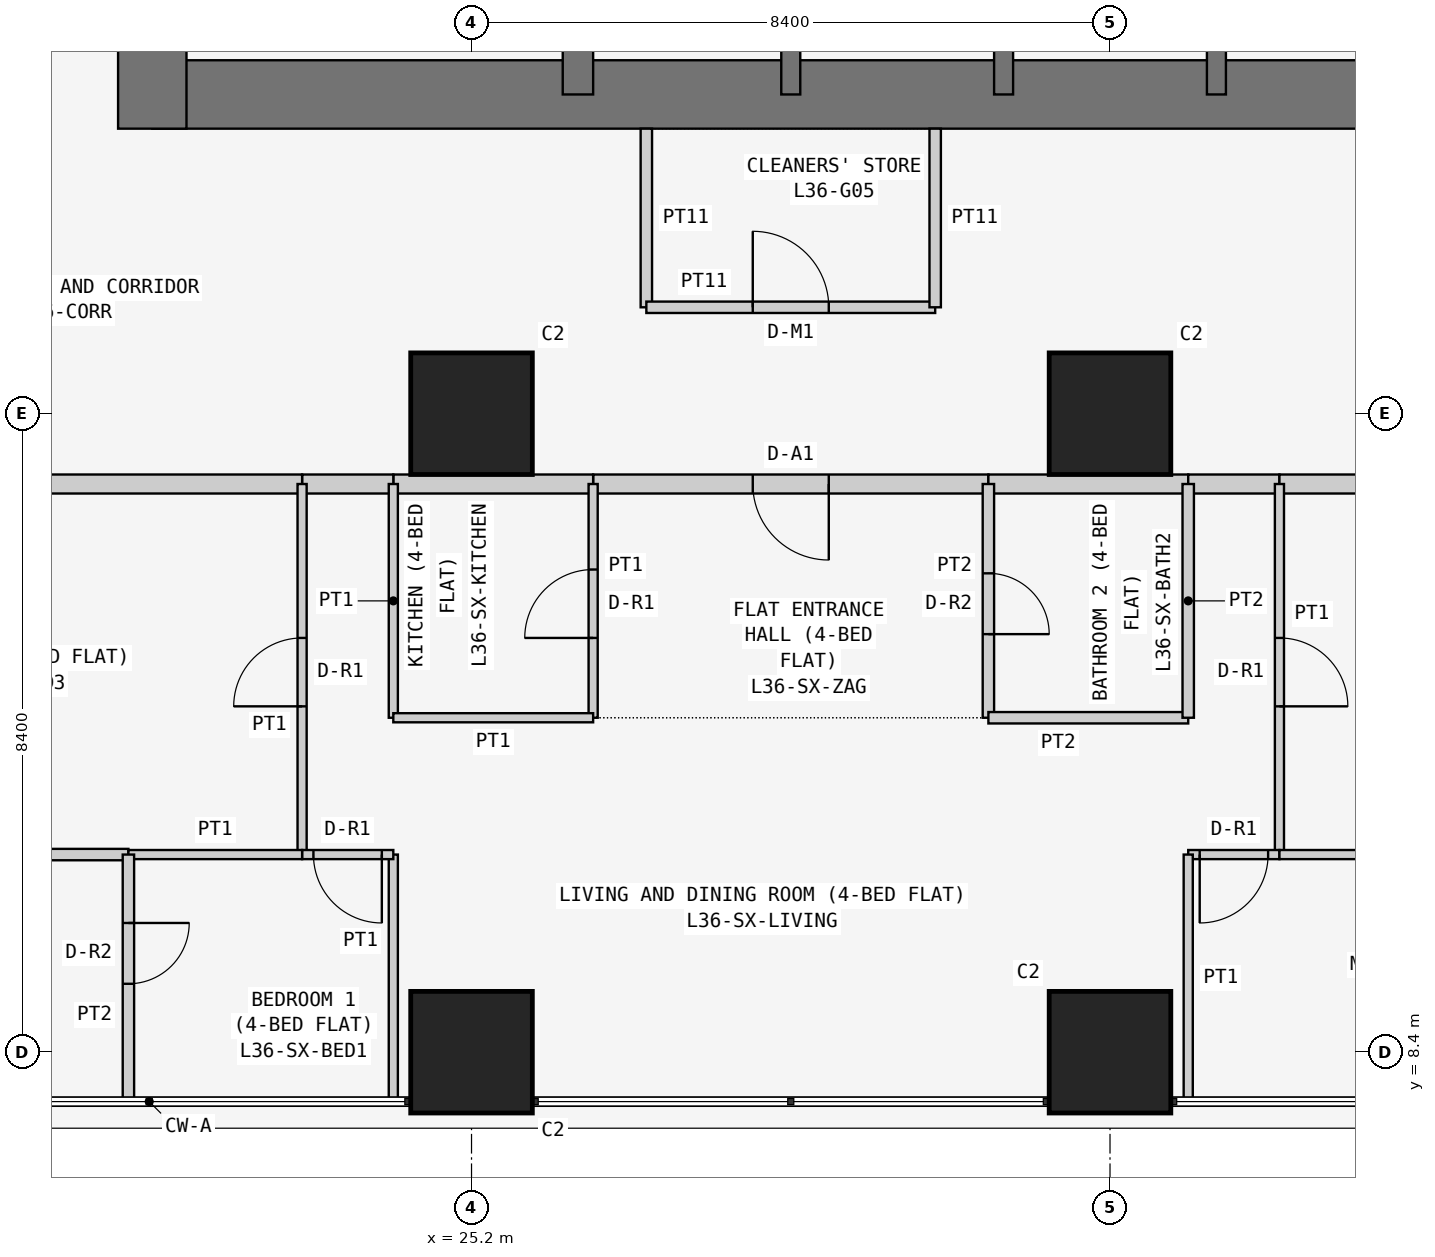
"""IFC4 building model, lengths in metres.
Left out: names, types, materials, properties, quantities, classifications, styles, units other than length and angle.
Written with IfcOpenShell. Run it as: python <this file> out.ifc"""

import sys

from ifc_helpers import new_model, si_unit, direction, frame, frame_2d, origin, origin_2d, place, context, subcontext, project, spatial, rectangle, extrude, element, fill, save


model = new_model("IFC4")
c1 = context("Model", 3, precision=1e-05, world=origin(), true_north=direction((0.0, 1.0)))
c2 = subcontext(c1, "Body", "Model", "MODEL_VIEW")
j1 = project(units=[si_unit("LENGTHUNIT", "METRE"), si_unit("PLANEANGLEUNIT", "RADIAN")], contexts=[c1])
p1 = place(None, origin())
s1 = spatial("IfcSite", under=j1, at=p1, CompositionType="ELEMENT")
p2 = place(p1, origin())
s2 = spatial("IfcBuilding", under=s1, at=p2, CompositionType="ELEMENT")
p3 = place(p2, frame((0.0, 0.0, 141.3)))
s3 = spatial("IfcBuildingStorey", under=s2, at=p3, CompositionType="ELEMENT", Elevation=141.3)
for number, where, z_axis, x_axis in (
    (1, (25.2, 8.4, 0.0), (0.0, 0.0, 1.0), (1.0, 0.0, 0.0)),
    (2, (25.2, 16.8, 0.0), (0.0, 0.0, 1.0), (1.0, 0.0, 0.0)),
    (3, (33.6, 8.4, 0.0), (0.0, 0.0, 1.0), (1.0, 0.0, 0.0)),
    (4, (33.6, 16.8, 0.0), (0.0, 0.0, 1.0), (1.0, 0.0, 0.0)),
):
    element("IfcColumn", number, at=place(p3, frame(where, z_axis=z_axis, x_axis=x_axis)), inside=s3, PredefinedType="COLUMN", context=c2, shape_type="SweptSolid", body=[
        extrude(rectangle(XDim=1.6, YDim=1.6, at=origin_2d()), origin(), (0.0, 0.0, 1.0), 3.6),
    ])
p4 = place(p3, frame((21.0, 21.0, 0.0), z_axis=(0.0, 0.0, 1.0), x_axis=(1.0, 0.0, 0.0)))
e5 = element("IfcWall", 5, at=p4, inside=s3, PredefinedType="SHEAR", context=c2, shape_type="SweptSolid", body=[
    extrude(rectangle(XDim=17.25, YDim=0.9, at=frame_2d((8.625, 0.0))), origin(), (0.0, 0.0, 1.0), 3.6),
])
p5 = place(p3, frame((21.0, 37.8, 0.0), z_axis=(0.0, 0.0, 1.0), x_axis=(0.0, -1.0, 0.0)))
e6 = element("IfcWall", 6, at=p5, inside=s3, PredefinedType="SHEAR", context=c2, shape_type="SweptSolid", body=[
    extrude(rectangle(XDim=17.25, YDim=0.9, at=frame_2d((8.625, 0.0))), origin(), (0.0, 0.0, 1.0), 3.6),
])
p6 = place(p5, frame((5.4, 0.0, 0.0)))
e7 = element("IfcOpeningElement", 7, at=p6, cuts=e6, PredefinedType="OPENING", context=c2, shape_type="SweptSolid", body=[
    extrude(rectangle(XDim=1.2, YDim=2.1, at=frame_2d((0.6, 1.05))), frame((0.0, 0.46, 0.0), z_axis=(0.0, -1.0, 0.0), x_axis=(1.0, 0.0, 0.0)), (0.0, 0.0, 1.0), 0.92),
])
p7 = place(p3, frame((26.6, 21.0, 0.0), z_axis=(0.0, 0.0, 1.0), x_axis=(0.0, 1.0, 0.0)))
e8 = element("IfcWall", 8, at=p7, inside=s3, PredefinedType="SHEAR", context=c2, shape_type="SweptSolid", body=[
    extrude(rectangle(XDim=16.8, YDim=0.4, at=frame_2d((8.4, 0.0))), origin(), (0.0, 0.0, 1.0), 3.6),
])
p8 = place(p7, frame((10.4, 0.0, 0.0)))
e9 = element("IfcOpeningElement", 9, at=p8, cuts=e8, PredefinedType="OPENING", context=c2, shape_type="SweptSolid", body=[
    extrude(rectangle(XDim=1.2, YDim=2.1, at=frame_2d((0.6, 1.05))), frame((0.0, 0.21, 0.0), z_axis=(0.0, -1.0, 0.0), x_axis=(1.0, 0.0, 0.0)), (0.0, 0.0, 1.0), 0.42),
])
for number, where, z_axis, x_axis in (
    (10, (29.4, 21.0, 0.0), (0.0, 0.0, 1.0), (0.0, 1.0, 0.0)),
    (11, (32.2, 21.0, 0.0), (0.0, 0.0, 1.0), (0.0, 1.0, 0.0)),
    (12, (35.0, 21.0, 0.0), (0.0, 0.0, 1.0), (0.0, 1.0, 0.0)),
):
    element("IfcWall", number, at=place(p3, frame(where, z_axis=z_axis, x_axis=x_axis)), inside=s3, PredefinedType="SHEAR", context=c2, shape_type="SweptSolid", body=[
        extrude(rectangle(XDim=3.2, YDim=0.25, at=frame_2d((1.6, 0.0))), origin(), (0.0, 0.0, 1.0), 3.6),
    ])
p9 = place(p3, frame((27.5, 20.55, 0.0), z_axis=(0.0, 0.0, 1.0), x_axis=(0.0, -1.0, 0.0)))
e13 = element("IfcWall", 13, at=p9, inside=s3, PredefinedType="PARTITIONING", context=c2, shape_type="SweptSolid", body=[
    extrude(rectangle(XDim=2.35, YDim=0.15, at=frame_2d((1.175, 0.0))), origin(), (0.0, 0.0, 1.0), 3.45),
])
p10 = place(p3, frame((27.5, 18.2, 0.0), z_axis=(0.0, 0.0, 1.0), x_axis=(1.0, 0.0, 0.0)))
e14 = element("IfcWall", 14, at=p10, inside=s3, PredefinedType="PARTITIONING", context=c2, shape_type="SweptSolid", body=[
    extrude(rectangle(XDim=3.8, YDim=0.15, at=frame_2d((1.9, 0.0))), origin(), (0.0, 0.0, 1.0), 3.45),
])
p11 = place(p10, frame((1.4, 0.0, 0.0)))
e15 = element("IfcOpeningElement", 15, at=p11, cuts=e14, PredefinedType="OPENING", context=c2, shape_type="SweptSolid", body=[
    extrude(rectangle(XDim=1.0, YDim=2.1, at=frame_2d((0.5, 1.05))), frame((0.0, 0.085, 0.0), z_axis=(0.0, -1.0, 0.0), x_axis=(1.0, 0.0, 0.0)), (0.0, 0.0, 1.0), 0.17),
])
p12 = place(p3, frame((31.3, 18.2, 0.0), z_axis=(0.0, 0.0, 1.0), x_axis=(0.0, 1.0, 0.0)))
e16 = element("IfcWall", 16, at=p12, inside=s3, PredefinedType="PARTITIONING", context=c2, shape_type="SweptSolid", body=[
    extrude(rectangle(XDim=2.35, YDim=0.15, at=frame_2d((1.175, 0.0))), origin(), (0.0, 0.0, 1.0), 3.45),
])
p13 = place(p3, frame((32.0, 15.875, 0.0), z_axis=(0.0, 0.0, 1.0), x_axis=(-1.0, 0.0, 0.0)))
e17 = element("IfcWall", 17, at=p13, inside=s3, PredefinedType="PARTITIONING", context=c2, shape_type="SweptSolid", body=[
    extrude(rectangle(XDim=5.2, YDim=0.25, at=frame_2d((2.6, 0.0))), origin(), (0.0, 0.0, 1.0), 3.45),
])
p14 = place(p13, frame((2.1, 0.0, 0.0)))
e18 = element("IfcOpeningElement", 18, at=p14, cuts=e17, PredefinedType="OPENING", context=c2, shape_type="SweptSolid", body=[
    extrude(rectangle(XDim=1.0, YDim=2.1, at=frame_2d((0.5, 1.05))), frame((0.0, 0.135, 0.0), z_axis=(0.0, -1.0, 0.0), x_axis=(1.0, 0.0, 0.0)), (0.0, 0.0, 1.0), 0.27),
])
p15 = place(p3, frame((34.629, 15.875, 0.0), z_axis=(0.0, 0.0, 1.0), x_axis=(-1.0, 0.0, 0.0)))
e19 = element("IfcWall", 19, at=p15, inside=s3, PredefinedType="PARTITIONING", context=c2, shape_type="SweptSolid", body=[
    extrude(rectangle(XDim=2.629, YDim=0.25, at=frame_2d((1.314, 0.0))), origin(), (0.0, 0.0, 1.0), 3.45),
])
p16 = place(p3, frame((26.8, 15.875, 0.0), z_axis=(0.0, 0.0, 1.0), x_axis=(-1.0, 0.0, 0.0)))
e20 = element("IfcWall", 20, at=p16, inside=s3, PredefinedType="PARTITIONING", context=c2, shape_type="SweptSolid", body=[
    extrude(rectangle(XDim=2.629, YDim=0.25, at=frame_2d((1.314, 0.0))), origin(), (0.0, 0.0, 1.0), 3.45),
])
p17 = place(p3, frame((24.171, 15.875, 0.0), z_axis=(0.0, 0.0, 1.0), x_axis=(-1.0, 0.0, 0.0)))
e21 = element("IfcWall", 21, at=p17, inside=s3, PredefinedType="PARTITIONING", context=c2, shape_type="SweptSolid", body=[
    extrude(rectangle(XDim=1.2, YDim=0.25, at=frame_2d((0.6, 0.0))), origin(), (0.0, 0.0, 1.0), 3.45),
])
p18 = place(p3, frame((35.829, 15.875, 0.0), z_axis=(0.0, 0.0, 1.0), x_axis=(-1.0, 0.0, 0.0)))
e22 = element("IfcWall", 22, at=p18, inside=s3, PredefinedType="PARTITIONING", context=c2, shape_type="SweptSolid", body=[
    extrude(rectangle(XDim=1.2, YDim=0.25, at=frame_2d((0.6, 0.0))), origin(), (0.0, 0.0, 1.0), 3.45),
])
for number, where, z_axis, x_axis in (
    (23, (42.7, 15.875, 0.0), (0.0, 0.0, 1.0), (-1.0, 0.0, 0.0)),
    (24, (22.971, 15.875, 0.0), (0.0, 0.0, 1.0), (-1.0, 0.0, 0.0)),
):
    element("IfcWall", number, at=place(p3, frame(where, z_axis=z_axis, x_axis=x_axis)), inside=s3, PredefinedType="PARTITIONING", context=c2, shape_type="SweptSolid", body=[
        extrude(rectangle(XDim=6.871, YDim=0.25, at=frame_2d((3.436, 0.0))), origin(), (0.0, 0.0, 1.0), 3.45),
    ])
p19 = place(p3, frame((32.0, 12.8, 0.0), z_axis=(0.0, 0.0, 1.0), x_axis=(0.0, 1.0, 0.0)))
e25 = element("IfcWall", 25, at=p19, inside=s3, PredefinedType="PARTITIONING", context=c2, shape_type="SweptSolid", body=[
    extrude(rectangle(XDim=3.075, YDim=0.15, at=frame_2d((1.538, 0.0))), origin(), (0.0, 0.0, 1.0), 3.45),
])
p20 = place(p19, frame((1.1, 0.0, 0.0)))
e26 = element("IfcOpeningElement", 26, at=p20, cuts=e25, PredefinedType="OPENING", context=c2, shape_type="SweptSolid", body=[
    extrude(rectangle(XDim=0.8, YDim=2.1, at=frame_2d((0.4, 1.05))), frame((0.0, 0.085, 0.0), z_axis=(0.0, -1.0, 0.0), x_axis=(1.0, 0.0, 0.0)), (0.0, 0.0, 1.0), 0.17),
])
p21 = place(p3, frame((26.8, 15.875, 0.0), z_axis=(0.0, 0.0, 1.0), x_axis=(0.0, -1.0, 0.0)))
e27 = element("IfcWall", 27, at=p21, inside=s3, PredefinedType="PARTITIONING", context=c2, shape_type="SweptSolid", body=[
    extrude(rectangle(XDim=3.075, YDim=0.12, at=frame_2d((1.538, 0.0))), origin(), (0.0, 0.0, 1.0), 3.45),
])
p22 = place(p21, frame((1.125, 0.0, 0.0)))
e28 = element("IfcOpeningElement", 28, at=p22, cuts=e27, PredefinedType="OPENING", context=c2, shape_type="SweptSolid", body=[
    extrude(rectangle(XDim=0.9, YDim=2.1, at=frame_2d((0.45, 1.05))), frame((0.0, 0.07, 0.0), z_axis=(0.0, -1.0, 0.0), x_axis=(1.0, 0.0, 0.0)), (0.0, 0.0, 1.0), 0.14),
])
p23 = place(p3, frame((32.0, 12.8, 0.0), z_axis=(0.0, 0.0, 1.0), x_axis=(1.0, 0.0, 0.0)))
e29 = element("IfcWall", 29, at=p23, inside=s3, PredefinedType="PARTITIONING", context=c2, shape_type="SweptSolid", body=[
    extrude(rectangle(XDim=2.629, YDim=0.15, at=frame_2d((1.314, 0.0))), origin(), (0.0, 0.0, 1.0), 3.45),
])
p24 = place(p3, frame((34.629, 12.8, 0.0), z_axis=(0.0, 0.0, 1.0), x_axis=(0.0, 1.0, 0.0)))
e30 = element("IfcWall", 30, at=p24, inside=s3, PredefinedType="PARTITIONING", context=c2, shape_type="SweptSolid", body=[
    extrude(rectangle(XDim=3.075, YDim=0.15, at=frame_2d((1.538, 0.0))), origin(), (0.0, 0.0, 1.0), 3.45),
])
p25 = place(p3, frame((24.171, 15.875, 0.0), z_axis=(0.0, 0.0, 1.0), x_axis=(0.0, -1.0, 0.0)))
e31 = element("IfcWall", 31, at=p25, inside=s3, PredefinedType="PARTITIONING", context=c2, shape_type="SweptSolid", body=[
    extrude(rectangle(XDim=3.075, YDim=0.12, at=frame_2d((1.538, 0.0))), origin(), (0.0, 0.0, 1.0), 3.45),
])
p26 = place(p3, frame((24.171, 12.8, 0.0), z_axis=(0.0, 0.0, 1.0), x_axis=(1.0, 0.0, 0.0)))
e32 = element("IfcWall", 32, at=p26, inside=s3, PredefinedType="PARTITIONING", context=c2, shape_type="SweptSolid", body=[
    extrude(rectangle(XDim=2.629, YDim=0.12, at=frame_2d((1.314, 0.0))), origin(), (0.0, 0.0, 1.0), 3.45),
])
p27 = place(p3, frame((35.829, 15.875, 0.0), z_axis=(0.0, 0.0, 1.0), x_axis=(0.0, -1.0, 0.0)))
e33 = element("IfcWall", 33, at=p27, inside=s3, PredefinedType="PARTITIONING", context=c2, shape_type="SweptSolid", body=[
    extrude(rectangle(XDim=4.875, YDim=0.12, at=frame_2d((2.438, 0.0))), origin(), (0.0, 0.0, 1.0), 3.45),
])
p28 = place(p27, frame((2.025, 0.0, 0.0)))
e34 = element("IfcOpeningElement", 34, at=p28, cuts=e33, PredefinedType="OPENING", context=c2, shape_type="SweptSolid", body=[
    extrude(rectangle(XDim=0.9, YDim=2.1, at=frame_2d((0.45, 1.05))), frame((0.0, 0.07, 0.0), z_axis=(0.0, -1.0, 0.0), x_axis=(1.0, 0.0, 0.0)), (0.0, 0.0, 1.0), 0.14),
])
p29 = place(p3, frame((35.829, 11.0, 0.0), z_axis=(0.0, 0.0, 1.0), x_axis=(-1.0, 0.0, 0.0)))
e35 = element("IfcWall", 35, at=p29, inside=s3, PredefinedType="PARTITIONING", context=c2, shape_type="SweptSolid", body=[
    extrude(rectangle(XDim=1.2, YDim=0.12, at=frame_2d((0.6, 0.0))), origin(), (0.0, 0.0, 1.0), 3.45),
])
p30 = place(p29, frame((0.149, 0.0, 0.0)))
e36 = element("IfcOpeningElement", 36, at=p30, cuts=e35, PredefinedType="OPENING", context=c2, shape_type="SweptSolid", body=[
    extrude(rectangle(XDim=0.9, YDim=2.1, at=frame_2d((0.45, 1.05))), frame((0.0, 0.07, 0.0), z_axis=(0.0, -1.0, 0.0), x_axis=(1.0, 0.0, 0.0)), (0.0, 0.0, 1.0), 0.14),
])
p31 = place(p3, frame((34.629, 11.0, 0.0), z_axis=(0.0, 0.0, 1.0), x_axis=(0.0, -1.0, 0.0)))
e37 = element("IfcWall", 37, at=p31, inside=s3, PredefinedType="PARTITIONING", context=c2, shape_type="SweptSolid", body=[
    extrude(rectangle(XDim=3.25, YDim=0.12, at=frame_2d((1.625, 0.0))), origin(), (0.0, 0.0, 1.0), 3.45),
])
p32 = place(p3, frame((22.971, 11.0, 0.0), z_axis=(0.0, 0.0, 1.0), x_axis=(0.0, 1.0, 0.0)))
e38 = element("IfcWall", 38, at=p32, inside=s3, PredefinedType="PARTITIONING", context=c2, shape_type="SweptSolid", body=[
    extrude(rectangle(XDim=4.875, YDim=0.12, at=frame_2d((2.438, 0.0))), origin(), (0.0, 0.0, 1.0), 3.45),
])
p33 = place(p32, frame((1.95, 0.0, 0.0)))
e39 = element("IfcOpeningElement", 39, at=p33, cuts=e38, PredefinedType="OPENING", context=c2, shape_type="SweptSolid", body=[
    extrude(rectangle(XDim=0.9, YDim=2.1, at=frame_2d((0.45, 1.05))), frame((0.0, 0.07, 0.0), z_axis=(0.0, -1.0, 0.0), x_axis=(1.0, 0.0, 0.0)), (0.0, 0.0, 1.0), 0.14),
])
p34 = place(p3, frame((24.171, 7.75, 0.0), z_axis=(0.0, 0.0, 1.0), x_axis=(0.0, 1.0, 0.0)))
e40 = element("IfcWall", 40, at=p34, inside=s3, PredefinedType="PARTITIONING", context=c2, shape_type="SweptSolid", body=[
    extrude(rectangle(XDim=3.25, YDim=0.12, at=frame_2d((1.625, 0.0))), origin(), (0.0, 0.0, 1.0), 3.45),
])
p35 = place(p3, frame((24.171, 11.0, 0.0), z_axis=(0.0, 0.0, 1.0), x_axis=(-1.0, 0.0, 0.0)))
e41 = element("IfcWall", 41, at=p35, inside=s3, PredefinedType="PARTITIONING", context=c2, shape_type="SweptSolid", body=[
    extrude(rectangle(XDim=1.2, YDim=0.12, at=frame_2d((0.6, 0.0))), origin(), (0.0, 0.0, 1.0), 3.45),
])
p36 = place(p35, frame((0.151, 0.0, 0.0)))
e42 = element("IfcOpeningElement", 42, at=p36, cuts=e41, PredefinedType="OPENING", context=c2, shape_type="SweptSolid", body=[
    extrude(rectangle(XDim=0.9, YDim=2.1, at=frame_2d((0.45, 1.05))), frame((0.0, 0.07, 0.0), z_axis=(0.0, -1.0, 0.0), x_axis=(1.0, 0.0, 0.0)), (0.0, 0.0, 1.0), 0.14),
])
p37 = place(p3, frame((35.829, 11.0, 0.0), z_axis=(0.0, 0.0, 1.0), x_axis=(1.0, 0.0, 0.0)))
e43 = element("IfcWall", 43, at=p37, inside=s3, PredefinedType="PARTITIONING", context=c2, shape_type="SweptSolid", body=[
    extrude(rectangle(XDim=6.871, YDim=0.12, at=frame_2d((3.436, 0.0))), origin(), (0.0, 0.0, 1.0), 3.45),
])
p38 = place(p3, frame((16.1, 11.0, 0.0), z_axis=(0.0, 0.0, 1.0), x_axis=(1.0, 0.0, 0.0)))
e44 = element("IfcWall", 44, at=p38, inside=s3, PredefinedType="PARTITIONING", context=c2, shape_type="SweptSolid", body=[
    extrude(rectangle(XDim=4.586, YDim=0.15, at=frame_2d((2.293, 0.0))), origin(), (0.0, 0.0, 1.0), 3.45),
])
p39 = place(p3, frame((20.686, 11.0, 0.0), z_axis=(0.0, 0.0, 1.0), x_axis=(1.0, 0.0, 0.0)))
e45 = element("IfcWall", 45, at=p39, inside=s3, PredefinedType="PARTITIONING", context=c2, shape_type="SweptSolid", body=[
    extrude(rectangle(XDim=2.285, YDim=0.12, at=frame_2d((1.143, 0.0))), origin(), (0.0, 0.0, 1.0), 3.45),
])
p40 = place(p3, frame((20.686, 7.75, 0.0), z_axis=(0.0, 0.0, 1.0), x_axis=(0.0, 1.0, 0.0)))
e46 = element("IfcWall", 46, at=p40, inside=s3, PredefinedType="PARTITIONING", context=c2, shape_type="SweptSolid", body=[
    extrude(rectangle(XDim=3.25, YDim=0.15, at=frame_2d((1.625, 0.0))), origin(), (0.0, 0.0, 1.0), 3.45),
])
p41 = place(p40, frame((1.55, 0.0, 0.0)))
e47 = element("IfcOpeningElement", 47, at=p41, cuts=e46, PredefinedType="OPENING", context=c2, shape_type="SweptSolid", body=[
    extrude(rectangle(XDim=0.8, YDim=2.1, at=frame_2d((0.4, 1.05))), frame((0.0, 0.085, 0.0), z_axis=(0.0, -1.0, 0.0), x_axis=(1.0, 0.0, 0.0)), (0.0, 0.0, 1.0), 0.17),
])
p42 = place(p11, origin())
e48 = element("IfcDoor", 48, at=p42, inside=s3, OperationType="SINGLE_SWING_LEFT", PredefinedType="DOOR", context=c2, shape_type="SweptSolid", body=[
    extrude(rectangle(XDim=1.0, YDim=2.1, at=frame_2d((0.5, 1.05))), frame((0.0, 0.025, 0.0), z_axis=(0.0, -1.0, 0.0), x_axis=(1.0, 0.0, 0.0)), (0.0, 0.0, 1.0), 0.05),
])
fill(e15, e48)
p43 = place(p14, origin())
e49 = element("IfcDoor", 49, at=p43, inside=s3, OperationType="SINGLE_SWING_LEFT", PredefinedType="DOOR", context=c2, shape_type="SweptSolid", body=[
    extrude(rectangle(XDim=1.0, YDim=2.1, at=frame_2d((0.5, 1.05))), frame((0.0, 0.025, 0.0), z_axis=(0.0, -1.0, 0.0), x_axis=(1.0, 0.0, 0.0)), (0.0, 0.0, 1.0), 0.05),
])
fill(e18, e49)
p44 = place(p20, frame((0.8, 0.0, 0.0), z_axis=(0.0, 0.0, 1.0), x_axis=(-1.0, 0.0, 0.0)))
e50 = element("IfcDoor", 50, at=p44, inside=s3, OperationType="SINGLE_SWING_RIGHT", PredefinedType="DOOR", context=c2, shape_type="SweptSolid", body=[
    extrude(rectangle(XDim=0.8, YDim=2.1, at=frame_2d((0.4, 1.05))), frame((0.0, 0.025, 0.0), z_axis=(0.0, -1.0, 0.0), x_axis=(1.0, 0.0, 0.0)), (0.0, 0.0, 1.0), 0.05),
])
fill(e26, e50)
p45 = place(p22, frame((0.9, 0.0, 0.0), z_axis=(0.0, 0.0, 1.0), x_axis=(-1.0, 0.0, 0.0)))
e51 = element("IfcDoor", 51, at=p45, inside=s3, OperationType="SINGLE_SWING_LEFT", PredefinedType="DOOR", context=c2, shape_type="SweptSolid", body=[
    extrude(rectangle(XDim=0.9, YDim=2.1, at=frame_2d((0.45, 1.05))), frame((0.0, 0.025, 0.0), z_axis=(0.0, -1.0, 0.0), x_axis=(1.0, 0.0, 0.0)), (0.0, 0.0, 1.0), 0.05),
])
fill(e28, e51)
p46 = place(p28, origin())
e52 = element("IfcDoor", 52, at=p46, inside=s3, OperationType="SINGLE_SWING_RIGHT", PredefinedType="DOOR", context=c2, shape_type="SweptSolid", body=[
    extrude(rectangle(XDim=0.9, YDim=2.1, at=frame_2d((0.45, 1.05))), frame((0.0, 0.025, 0.0), z_axis=(0.0, -1.0, 0.0), x_axis=(1.0, 0.0, 0.0)), (0.0, 0.0, 1.0), 0.05),
])
fill(e34, e52)
p47 = place(p30, origin())
e53 = element("IfcDoor", 53, at=p47, inside=s3, OperationType="SINGLE_SWING_RIGHT", PredefinedType="DOOR", context=c2, shape_type="SweptSolid", body=[
    extrude(rectangle(XDim=0.9, YDim=2.1, at=frame_2d((0.45, 1.05))), frame((0.0, 0.025, 0.0), z_axis=(0.0, -1.0, 0.0), x_axis=(1.0, 0.0, 0.0)), (0.0, 0.0, 1.0), 0.05),
])
fill(e36, e53)
p48 = place(p33, origin())
e54 = element("IfcDoor", 54, at=p48, inside=s3, OperationType="SINGLE_SWING_LEFT", PredefinedType="DOOR", context=c2, shape_type="SweptSolid", body=[
    extrude(rectangle(XDim=0.9, YDim=2.1, at=frame_2d((0.45, 1.05))), frame((0.0, 0.025, 0.0), z_axis=(0.0, -1.0, 0.0), x_axis=(1.0, 0.0, 0.0)), (0.0, 0.0, 1.0), 0.05),
])
fill(e39, e54)
p49 = place(p36, origin())
e55 = element("IfcDoor", 55, at=p49, inside=s3, OperationType="SINGLE_SWING_LEFT", PredefinedType="DOOR", context=c2, shape_type="SweptSolid", body=[
    extrude(rectangle(XDim=0.9, YDim=2.1, at=frame_2d((0.45, 1.05))), frame((0.0, 0.025, 0.0), z_axis=(0.0, -1.0, 0.0), x_axis=(1.0, 0.0, 0.0)), (0.0, 0.0, 1.0), 0.05),
])
fill(e42, e55)
p50 = place(p41, frame((0.8, 0.0, 0.0), z_axis=(0.0, 0.0, 1.0), x_axis=(-1.0, 0.0, 0.0)))
e56 = element("IfcDoor", 56, at=p50, inside=s3, OperationType="SINGLE_SWING_LEFT", PredefinedType="DOOR", context=c2, shape_type="SweptSolid", body=[
    extrude(rectangle(XDim=0.8, YDim=2.1, at=frame_2d((0.4, 1.05))), frame((0.0, 0.025, 0.0), z_axis=(0.0, -1.0, 0.0), x_axis=(1.0, 0.0, 0.0)), (0.0, 0.0, 1.0), 0.05),
])
fill(e47, e56)
save(model, sys.argv[1])
